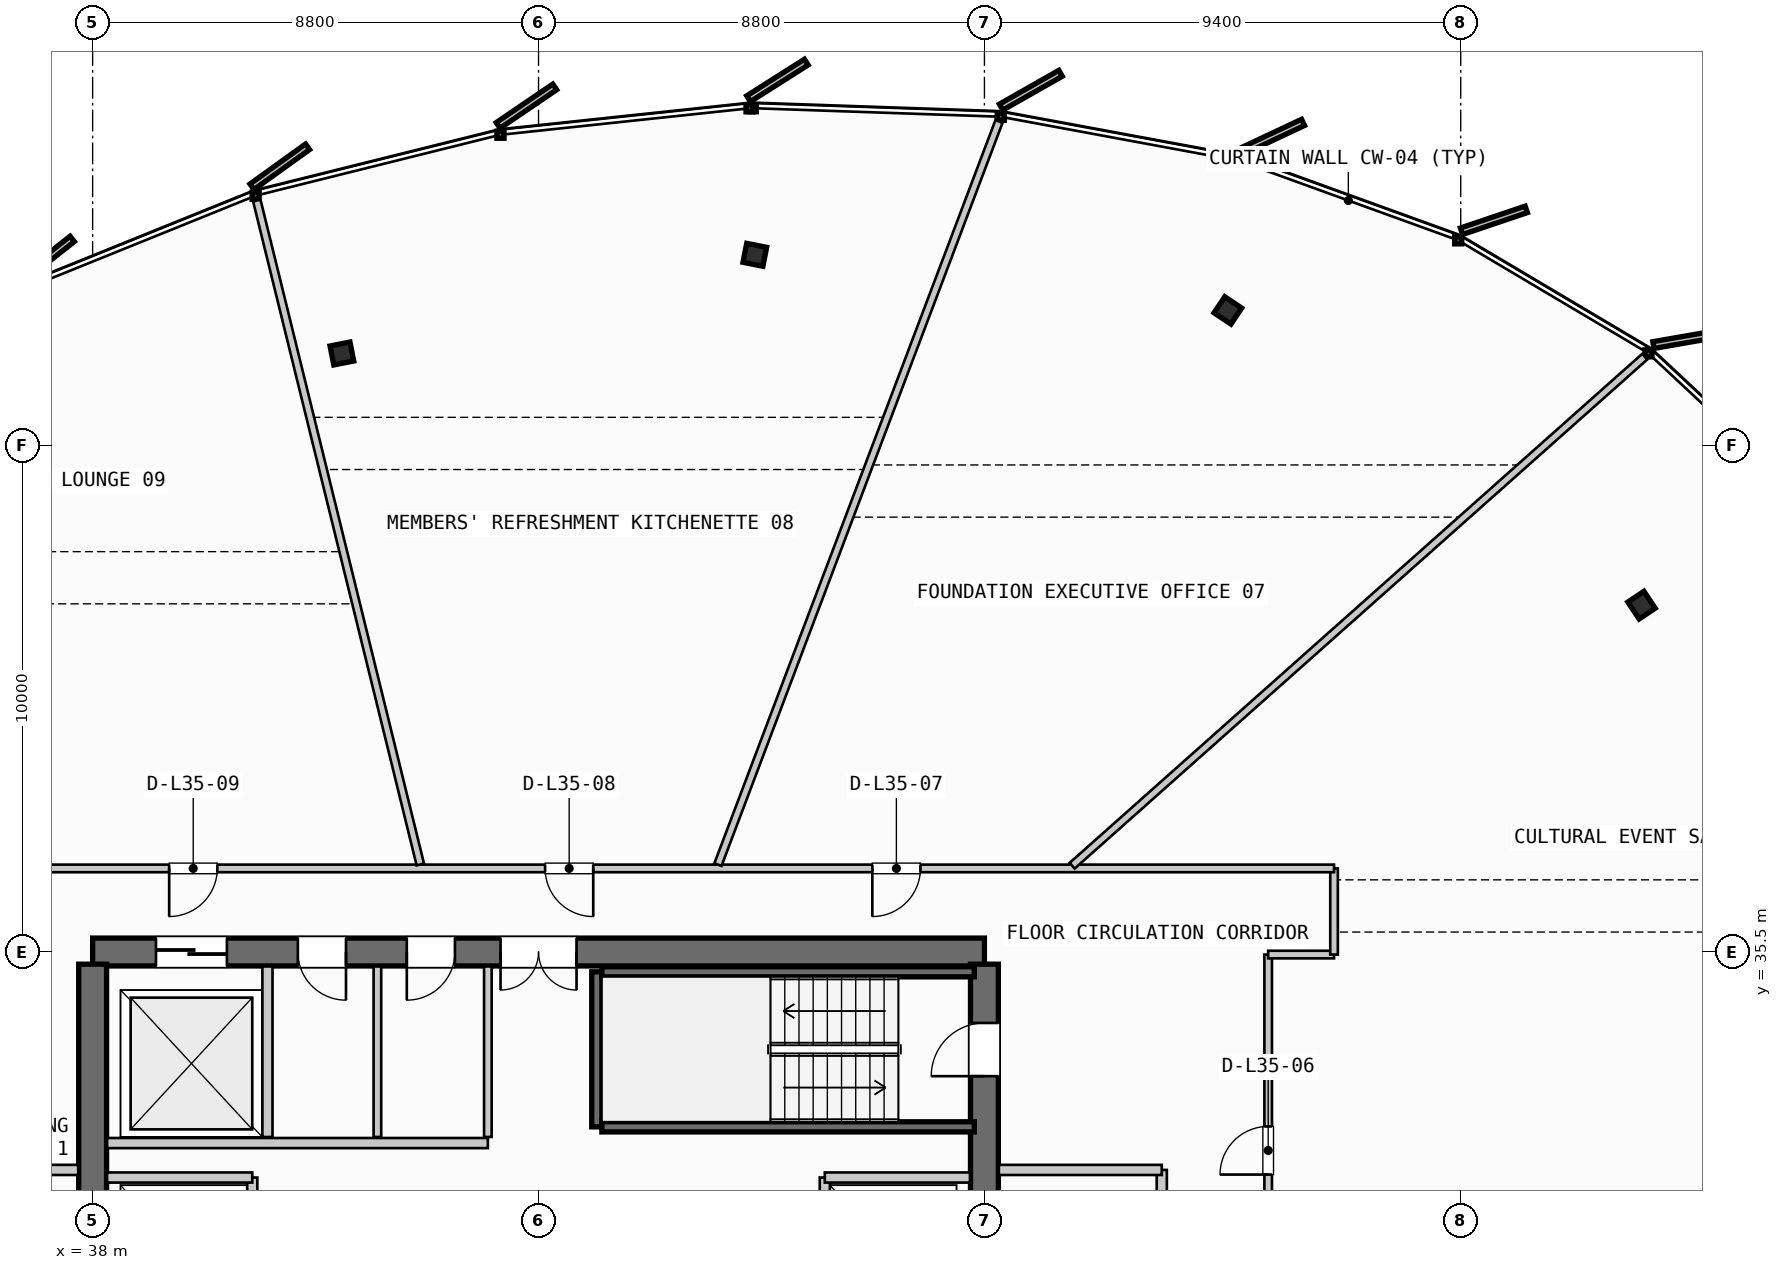
"""IFC4 building model, lengths in metres.
Left out: names, types, materials, properties, quantities, classifications, styles, units other than length and angle.
Written with IfcOpenShell. Run it as: python <this file> out.ifc"""

import sys

from ifc_helpers import new_model, si_unit, direction, frame, frame_2d, origin, origin_2d, place, context, subcontext, project, spatial, rectangle, i_section, extrude, source, transform, mapped, element, fill, save


model = new_model("IFC4")
c1 = context("Model", 3, precision=1e-05, world=origin(), true_north=direction((0.0, 1.0)))
c2 = subcontext(c1, "Body", "Model", "MODEL_VIEW")
j1 = project(units=[si_unit("LENGTHUNIT", "METRE"), si_unit("PLANEANGLEUNIT", "RADIAN")], contexts=[c1])
p1 = place(None, origin())
s1 = spatial("IfcSite", under=j1, at=p1, CompositionType="ELEMENT")
p2 = place(p1, origin())
s2 = spatial("IfcBuilding", under=s1, at=p2, CompositionType="ELEMENT")
p3 = place(p2, frame((0.0, 0.0, 139.45)))
s3 = spatial("IfcBuildingStorey", under=s2, at=p3, CompositionType="ELEMENT", Elevation=139.45)
p4 = place(p3, frame((55.6, 35.5, 0.0), z_axis=(0.0, 0.0, 1.0), x_axis=(-1.0, 0.0, 0.0)))
e1 = element("IfcWall", 1, at=p4, inside=s3, PredefinedType="SHEAR", context=c2, shape_type="SweptSolid", body=[
    extrude(rectangle(XDim=17.6, YDim=0.55, at=frame_2d((8.8, 0.0))), origin(), (0.0, 0.0, 1.0), 3.3),
])
p5 = place(p4, frame((8.05, 0.0, 0.0)))
e2 = element("IfcOpeningElement", 2, at=p5, cuts=e1, PredefinedType="OPENING", context=c2, shape_type="SweptSolid", body=[
    extrude(rectangle(XDim=1.5, YDim=2.2, at=frame_2d((0.75, 1.1))), frame((0.0, 0.285, 0.0), z_axis=(0.0, -1.0, 0.0), x_axis=(1.0, 0.0, 0.0)), (0.0, 0.0, 1.0), 0.57),
])
p6 = place(p4, frame((14.95, 0.0, 0.0)))
e3 = element("IfcOpeningElement", 3, at=p6, cuts=e1, PredefinedType="OPENING", context=c2, shape_type="SweptSolid", body=[
    extrude(rectangle(XDim=1.4, YDim=2.3, at=frame_2d((0.7, 1.15))), frame((0.0, 0.285, 0.0), z_axis=(0.0, -1.0, 0.0), x_axis=(1.0, 0.0, 0.0)), (0.0, 0.0, 1.0), 0.57),
])
p7 = place(p4, frame((12.6, 0.0, 0.0)))
e4 = element("IfcOpeningElement", 4, at=p7, cuts=e1, PredefinedType="OPENING", context=c2, shape_type="SweptSolid", body=[
    extrude(rectangle(XDim=0.95, YDim=2.15, at=frame_2d((0.475, 1.075))), frame((0.0, 0.285, 0.0), z_axis=(0.0, -1.0, 0.0), x_axis=(1.0, 0.0, 0.0)), (0.0, 0.0, 1.0), 0.57),
])
p8 = place(p4, frame((10.45, 0.0, 0.0)))
e5 = element("IfcOpeningElement", 5, at=p8, cuts=e1, PredefinedType="OPENING", context=c2, shape_type="SweptSolid", body=[
    extrude(rectangle(XDim=0.95, YDim=2.15, at=frame_2d((0.475, 1.075))), frame((0.0, 0.285, 0.0), z_axis=(0.0, -1.0, 0.0), x_axis=(1.0, 0.0, 0.0)), (0.0, 0.0, 1.0), 0.57),
])
p9 = place(p3, frame((38.0, 35.26, 0.0), z_axis=(0.0, 0.0, 1.0), x_axis=(0.0, -1.0, 0.0)))
e6 = element("IfcWall", 6, at=p9, inside=s3, PredefinedType="SHEAR", context=c2, shape_type="SweptSolid", body=[
    extrude(rectangle(XDim=14.92, YDim=0.55, at=frame_2d((7.46, 0.0))), origin(), (0.0, 0.0, 1.0), 3.3),
])
p10 = place(p9, frame((5.21, 0.0, 0.0)))
e7 = element("IfcOpeningElement", 7, at=p10, cuts=e6, PredefinedType="OPENING", context=c2, shape_type="SweptSolid", body=[
    extrude(rectangle(XDim=1.1, YDim=2.2, at=frame_2d((0.55, 1.1))), frame((0.0, 0.285, 0.0), z_axis=(0.0, -1.0, 0.0), x_axis=(1.0, 0.0, 0.0)), (0.0, 0.0, 1.0), 0.57),
])
p11 = place(p3, frame((55.6, 20.34, 0.0), z_axis=(0.0, 0.0, 1.0), x_axis=(0.0, 1.0, 0.0)))
e8 = element("IfcWall", 8, at=p11, inside=s3, PredefinedType="SHEAR", context=c2, shape_type="SweptSolid", body=[
    extrude(rectangle(XDim=14.92, YDim=0.55, at=frame_2d((7.46, 0.0))), origin(), (0.0, 0.0, 1.0), 3.3),
])
p12 = place(p11, frame((12.71, 0.0, 0.0)))
e9 = element("IfcOpeningElement", 9, at=p12, cuts=e8, PredefinedType="OPENING", context=c2, shape_type="SweptSolid", body=[
    extrude(rectangle(XDim=1.05, YDim=2.15, at=frame_2d((0.525, 1.075))), frame((0.0, 0.285, 0.0), z_axis=(0.0, -1.0, 0.0), x_axis=(1.0, 0.0, 0.0)), (0.0, 0.0, 1.0), 0.57),
])
p13 = place(p11, frame((8.61, 0.0, 0.0)))
e10 = element("IfcOpeningElement", 10, at=p13, cuts=e8, PredefinedType="OPENING", context=c2, shape_type="SweptSolid", body=[
    extrude(rectangle(XDim=1.1, YDim=2.2, at=frame_2d((0.55, 1.1))), frame((0.0, 0.285, 0.0), z_axis=(0.0, -1.0, 0.0), x_axis=(1.0, 0.0, 0.0)), (0.0, 0.0, 1.0), 0.57),
])
m1 = source(origin(), c2, "Body", "SweptSolid", [
    extrude(i_section(OverallWidth=0.401, OverallDepth=0.381, WebThickness=0.032, FlangeThickness=0.051, FilletRadius=0.015, at=origin_2d()), origin(), (0.0, 0.0, 1.0), 3.3),
])
for number, where, z_axis, x_axis in (
    (11, (68.569, 42.345, 0.0), (0.0, 0.0, 1.0), (0.831, 0.556, 0.0)),
    (12, (60.405, 48.161, 0.0), (0.0, 0.0, 1.0), (0.556, 0.831, 0.0)),
    (13, (51.069, 49.259, 0.0), (0.0, 0.0, 1.0), (0.195, 0.981, 0.0)),
    (14, (42.919, 47.311, 0.0), (0.0, 0.0, 1.0), (-0.195, 0.981, 0.0)),
):
    element("IfcColumn", number, at=place(p3, frame(where, z_axis=z_axis, x_axis=x_axis)), inside=s3, PredefinedType="COLUMN", context=c2, shape_type="MappedRepresentation", body=[
        mapped(m1, transform((0.0, 0.0, 0.0), scale=1.0)),
    ])
p14 = place(p3, frame((47.95, 32.05, 0.0), z_axis=(0.0, 0.0, 1.0), x_axis=(0.0, 1.0, 0.0)))
e15 = element("IfcWall", 15, at=p14, inside=s3, PredefinedType="SHEAR", context=c2, shape_type="SweptSolid", body=[
    extrude(rectangle(XDim=3.06, YDim=0.2, at=frame_2d((1.53, 0.0))), origin(), (0.0, 0.0, 1.0), 3.3),
])
for number, where, z_axis, x_axis in (
    (16, (48.05, 35.11, 0.0), (0.0, 0.0, 1.0), (1.0, 0.0, 0.0)),
    (17, (55.4, 32.05, 0.0), (0.0, 0.0, 1.0), (-1.0, 0.0, 0.0)),
):
    element("IfcWall", number, at=place(p3, frame(where, z_axis=z_axis, x_axis=x_axis)), inside=s3, PredefinedType="SHEAR", context=c2, shape_type="SweptSolid", body=[
        extrude(rectangle(XDim=7.35, YDim=0.2, at=frame_2d((3.675, 0.0))), origin(), (0.0, 0.0, 1.0), 3.3),
    ])
p15 = place(p3, frame((41.15, 27.95, 0.0), z_axis=(0.0, 0.0, 1.0), x_axis=(0.0, 1.0, 0.0)))
e18 = element("IfcWall", 18, at=p15, inside=s3, PredefinedType="PARTITIONING", context=c2, shape_type="SweptSolid", body=[
    extrude(rectangle(XDim=3.1, YDim=0.2, at=frame_2d((1.55, 0.0))), origin(), (0.0, 0.0, 1.0), 2.305),
])
p16 = place(p3, frame((38.285, 31.05, 0.0), z_axis=(0.0, 0.0, 1.0), x_axis=(1.0, 0.0, 0.0)))
e19 = element("IfcWall", 19, at=p16, inside=s3, PredefinedType="PARTITIONING", context=c2, shape_type="SweptSolid", body=[
    extrude(rectangle(XDim=2.865, YDim=0.2, at=frame_2d((1.433, 0.0))), origin(), (0.0, 0.0, 1.0), 2.305),
])
p17 = place(p3, frame((34.5, 31.2, 0.0), z_axis=(0.0, 0.0, 1.0), x_axis=(1.0, 0.0, 0.0)))
e20 = element("IfcWall", 20, at=p17, inside=s3, PredefinedType="PARTITIONING", context=c2, shape_type="SweptSolid", body=[
    extrude(rectangle(XDim=3.215, YDim=0.2, at=frame_2d((1.607, 0.0))), origin(), (0.0, 0.0, 1.0), 2.305),
])
p18 = place(p3, frame((52.45, 27.95, 0.0), z_axis=(0.0, 0.0, 1.0), x_axis=(0.0, 1.0, 0.0)))
e21 = element("IfcWall", 21, at=p18, inside=s3, PredefinedType="PARTITIONING", context=c2, shape_type="SweptSolid", body=[
    extrude(rectangle(XDim=3.1, YDim=0.2, at=frame_2d((1.55, 0.0))), origin(), (0.0, 0.0, 1.0), 2.305),
])
p19 = place(p3, frame((52.45, 31.05, 0.0), z_axis=(0.0, 0.0, 1.0), x_axis=(1.0, 0.0, 0.0)))
e22 = element("IfcWall", 22, at=p19, inside=s3, PredefinedType="PARTITIONING", context=c2, shape_type="SweptSolid", body=[
    extrude(rectangle(XDim=2.865, YDim=0.2, at=frame_2d((1.433, 0.0))), origin(), (0.0, 0.0, 1.0), 2.305),
])
p20 = place(p3, frame((59.1, 26.8, 0.0), z_axis=(0.0, 0.0, 1.0), x_axis=(0.0, 1.0, 0.0)))
e23 = element("IfcWall", 23, at=p20, inside=s3, PredefinedType="PARTITIONING", context=c2, shape_type="SweptSolid", body=[
    extrude(rectangle(XDim=4.4, YDim=0.2, at=frame_2d((2.2, 0.0))), origin(), (0.0, 0.0, 1.0), 2.305),
])
p21 = place(p20, frame((1.65, 0.0, 0.0)))
e24 = element("IfcOpeningElement", 24, at=p21, cuts=e23, PredefinedType="OPENING", context=c2, shape_type="SweptSolid", body=[
    extrude(rectangle(XDim=1.05, YDim=2.15, at=frame_2d((0.525, 1.075))), frame((0.0, 0.11, 0.0), z_axis=(0.0, -1.0, 0.0), x_axis=(1.0, 0.0, 0.0)), (0.0, 0.0, 1.0), 0.22),
])
p22 = place(p3, frame((55.885, 31.2, 0.0), z_axis=(0.0, 0.0, 1.0), x_axis=(1.0, 0.0, 0.0)))
e25 = element("IfcWall", 25, at=p22, inside=s3, PredefinedType="PARTITIONING", context=c2, shape_type="SweptSolid", body=[
    extrude(rectangle(XDim=3.215, YDim=0.2, at=frame_2d((1.607, 0.0))), origin(), (0.0, 0.0, 1.0), 2.305),
])
p23 = place(p3, frame((41.45, 31.85, 0.0), z_axis=(0.0, 0.0, 1.0), x_axis=(0.0, 1.0, 0.0)))
e26 = element("IfcWall", 26, at=p23, inside=s3, PredefinedType="PARTITIONING", context=c2, shape_type="SweptSolid", body=[
    extrude(rectangle(XDim=3.365, YDim=0.2, at=frame_2d((1.683, 0.0))), origin(), (0.0, 0.0, 1.0), 2.305),
])
p24 = place(p3, frame((38.285, 31.73, 0.0), z_axis=(0.0, 0.0, 1.0), x_axis=(1.0, 0.0, 0.0)))
e27 = element("IfcWall", 27, at=p24, inside=s3, PredefinedType="PARTITIONING", context=c2, shape_type="SweptSolid", body=[
    extrude(rectangle(XDim=7.515, YDim=0.2, at=frame_2d((3.758, 0.0))), origin(), (0.0, 0.0, 1.0), 2.305),
])
p25 = place(p3, frame((45.8, 31.85, 0.0), z_axis=(0.0, 0.0, 1.0), x_axis=(0.0, 1.0, 0.0)))
e28 = element("IfcWall", 28, at=p25, inside=s3, PredefinedType="PARTITIONING", context=c2, shape_type="SweptSolid", body=[
    extrude(rectangle(XDim=3.365, YDim=0.15, at=frame_2d((1.683, 0.0))), origin(), (0.0, 0.0, 1.0), 2.305),
])
p26 = place(p3, frame((43.62, 31.85, 0.0), z_axis=(0.0, 0.0, 1.0), x_axis=(0.0, 1.0, 0.0)))
e29 = element("IfcWall", 29, at=p26, inside=s3, PredefinedType="PLUMBINGWALL", context=c2, shape_type="SweptSolid", body=[
    extrude(rectangle(XDim=3.365, YDim=0.15, at=frame_2d((1.683, 0.0))), origin(), (0.0, 0.0, 1.0), 2.305),
])
p27 = place(p3, frame((61.2, 20.15, 0.0), z_axis=(0.0, 0.0, 1.0), x_axis=(0.0, 1.0, 0.0)))
e30 = element("IfcWall", 30, at=p27, inside=s3, PredefinedType="PARTITIONING", context=c2, shape_type="SweptSolid", body=[
    extrude(rectangle(XDim=15.3, YDim=0.15, at=frame_2d((7.65, 0.0))), origin(), (0.0, 0.0, 1.0), 2.305),
])
p28 = place(p27, frame((5.187, 0.0, 0.0)))
e31 = element("IfcOpeningElement", 31, at=p28, cuts=e30, PredefinedType="OPENING", context=c2, shape_type="SweptSolid", body=[
    extrude(rectangle(XDim=0.95, YDim=2.15, at=frame_2d((0.475, 1.075))), frame((0.0, 0.085, 0.0), z_axis=(0.0, -1.0, 0.0), x_axis=(1.0, 0.0, 0.0)), (0.0, 0.0, 1.0), 0.17),
])
p29 = place(p27, frame((10.958, 0.0, 0.0)))
e32 = element("IfcOpeningElement", 32, at=p29, cuts=e30, PredefinedType="OPENING", context=c2, shape_type="SweptSolid", body=[
    extrude(rectangle(XDim=0.95, YDim=2.15, at=frame_2d((0.475, 1.075))), frame((0.0, 0.085, 0.0), z_axis=(0.0, -1.0, 0.0), x_axis=(1.0, 0.0, 0.0)), (0.0, 0.0, 1.0), 0.17),
])
p30 = place(p3, frame((61.2, 35.45, 0.0), z_axis=(0.0, 0.0, 1.0), x_axis=(1.0, 0.0, 0.0)))
e33 = element("IfcWall", 33, at=p30, inside=s3, PredefinedType="PARTITIONING", context=c2, shape_type="SweptSolid", body=[
    extrude(rectangle(XDim=1.3, YDim=0.15, at=frame_2d((0.65, 0.0))), origin(), (0.0, 0.0, 1.0), 2.305),
])
p31 = place(p3, frame((62.5, 35.45, 0.0), z_axis=(0.0, 0.0, 1.0), x_axis=(0.0, 1.0, 0.0)))
e34 = element("IfcWall", 34, at=p31, inside=s3, PredefinedType="PARTITIONING", context=c2, shape_type="SweptSolid", body=[
    extrude(rectangle(XDim=1.7, YDim=0.15, at=frame_2d((0.85, 0.0))), origin(), (0.0, 0.0, 1.0), 2.305),
])
p32 = place(p3, frame((62.5, 37.15, 0.0), z_axis=(0.0, 0.0, 1.0), x_axis=(-1.0, 0.0, 0.0)))
e35 = element("IfcWall", 35, at=p32, inside=s3, PredefinedType="PARTITIONING", context=c2, shape_type="SweptSolid", body=[
    extrude(rectangle(XDim=31.4, YDim=0.15, at=frame_2d((15.7, 0.0))), origin(), (0.0, 0.0, 1.0), 2.305),
])
p33 = place(p32, frame((8.163, 0.0, 0.0)))
e36 = element("IfcOpeningElement", 36, at=p33, cuts=e35, PredefinedType="OPENING", context=c2, shape_type="SweptSolid", body=[
    extrude(rectangle(XDim=0.95, YDim=2.15, at=frame_2d((0.475, 1.075))), frame((0.0, 0.085, 0.0), z_axis=(0.0, -1.0, 0.0), x_axis=(1.0, 0.0, 0.0)), (0.0, 0.0, 1.0), 0.17),
])
p34 = place(p32, frame((14.62, 0.0, 0.0)))
e37 = element("IfcOpeningElement", 37, at=p34, cuts=e35, PredefinedType="OPENING", context=c2, shape_type="SweptSolid", body=[
    extrude(rectangle(XDim=0.95, YDim=2.15, at=frame_2d((0.475, 1.075))), frame((0.0, 0.085, 0.0), z_axis=(0.0, -1.0, 0.0), x_axis=(1.0, 0.0, 0.0)), (0.0, 0.0, 1.0), 0.17),
])
p35 = place(p32, frame((22.04, 0.0, 0.0)))
e38 = element("IfcOpeningElement", 38, at=p35, cuts=e35, PredefinedType="OPENING", context=c2, shape_type="SweptSolid", body=[
    extrude(rectangle(XDim=0.95, YDim=2.15, at=frame_2d((0.475, 1.075))), frame((0.0, 0.085, 0.0), z_axis=(0.0, -1.0, 0.0), x_axis=(1.0, 0.0, 0.0)), (0.0, 0.0, 1.0), 0.17),
])
p36 = place(p3, frame((57.332, 37.203, 0.0), z_axis=(0.0, 0.0, 1.0), x_axis=(0.747365661558, 0.664412949847, 0.0)))
e39 = element("IfcWall", 39, at=p36, inside=s3, PredefinedType="PARTITIONING", context=c2, shape_type="SweptSolid", body=[
    extrude(rectangle(XDim=15.119, YDim=0.15, at=frame_2d((7.56, 0.0))), origin(), (0.0, 0.0, 1.0), 2.305),
])
p37 = place(p3, frame((50.341, 37.225, 0.0), z_axis=(0.0, 0.0, 1.0), x_axis=(0.353744838931, 0.935341963631, 0.0)))
e40 = element("IfcWall", 40, at=p37, inside=s3, PredefinedType="PARTITIONING", context=c2, shape_type="SweptSolid", body=[
    extrude(rectangle(XDim=15.679, YDim=0.15, at=frame_2d((7.839, 0.0))), origin(), (0.0, 0.0, 1.0), 2.305),
])
p38 = place(p3, frame((44.467, 37.228, 0.0), z_axis=(0.0, 0.0, 1.0), x_axis=(-0.239136633235, 0.97098592711, 0.0)))
e41 = element("IfcWall", 41, at=p38, inside=s3, PredefinedType="PARTITIONING", context=c2, shape_type="SweptSolid", body=[
    extrude(rectangle(XDim=13.492, YDim=0.15, at=frame_2d((6.746, 0.0))), origin(), (0.0, 0.0, 1.0), 2.305),
])
m2 = source(origin(), c2, "Body", "SweptSolid", [
    extrude(rectangle(XDim=1.05, YDim=2.15, at=frame_2d((0.525, 1.075))), frame((0.0, 0.025, 0.0), z_axis=(0.0, -1.0, 0.0), x_axis=(1.0, 0.0, 0.0)), (0.0, 0.0, 1.0), 0.05),
])
p39 = place(p12, origin())
e42 = element("IfcDoor", 42, at=p39, inside=s3, OperationType="SINGLE_SWING_LEFT", PredefinedType="DOOR", context=c2, shape_type="MappedRepresentation", body=[
    mapped(m2, transform((0.0, 0.0, 0.0), scale=1.0)),
])
fill(e9, e42)
m3 = source(origin(), c2, "Body", "SweptSolid", [
    extrude(rectangle(XDim=1.5, YDim=2.2, at=frame_2d((0.75, 1.1))), frame((0.0, 0.025, 0.0), z_axis=(0.0, -1.0, 0.0), x_axis=(1.0, 0.0, 0.0)), (0.0, 0.0, 1.0), 0.05),
])
p40 = place(p5, origin())
e43 = element("IfcDoor", 43, at=p40, inside=s3, OperationType="DOUBLE_DOOR_SINGLE_SWING", PredefinedType="DOOR", context=c2, shape_type="MappedRepresentation", body=[
    mapped(m3, transform((0.0, 0.0, 0.0), scale=1.0)),
])
fill(e2, e43)
m4 = source(origin(), c2, "Body", "SweptSolid", [
    extrude(rectangle(XDim=1.4, YDim=2.3, at=frame_2d((0.7, 1.15))), frame((0.0, 0.025, 0.0), z_axis=(0.0, -1.0, 0.0), x_axis=(1.0, 0.0, 0.0)), (0.0, 0.0, 1.0), 0.05),
])
p41 = place(p6, origin())
e44 = element("IfcDoor", 44, at=p41, inside=s3, OperationType="SLIDING_TO_RIGHT", PredefinedType="DOOR", context=c2, shape_type="MappedRepresentation", body=[
    mapped(m4, transform((0.0, 0.0, 0.0), scale=1.0)),
])
fill(e3, e44)
m5 = source(origin(), c2, "Body", "SweptSolid", [
    extrude(rectangle(XDim=0.95, YDim=2.15, at=frame_2d((0.475, 1.075))), frame((0.0, 0.025, 0.0), z_axis=(0.0, -1.0, 0.0), x_axis=(1.0, 0.0, 0.0)), (0.0, 0.0, 1.0), 0.05),
])
p42 = place(p7, origin())
e45 = element("IfcDoor", 45, at=p42, inside=s3, OperationType="SINGLE_SWING_LEFT", PredefinedType="DOOR", context=c2, shape_type="MappedRepresentation", body=[
    mapped(m5, transform((0.0, 0.0, 0.0), scale=1.0)),
])
fill(e4, e45)
p43 = place(p8, origin())
e46 = element("IfcDoor", 46, at=p43, inside=s3, OperationType="SINGLE_SWING_RIGHT", PredefinedType="DOOR", context=c2, shape_type="MappedRepresentation", body=[
    mapped(m5, transform((0.0, 0.0, 0.0), scale=1.0)),
])
fill(e5, e46)
p44 = place(p29, origin())
e47 = element("IfcDoor", 47, at=p44, inside=s3, OperationType="SINGLE_SWING_LEFT", PredefinedType="DOOR", context=c2, shape_type="MappedRepresentation", body=[
    mapped(m5, transform((0.0, 0.0, 0.0), scale=1.0)),
])
fill(e32, e47)
p45 = place(p33, origin())
e48 = element("IfcDoor", 48, at=p45, inside=s3, OperationType="SINGLE_SWING_RIGHT", PredefinedType="DOOR", context=c2, shape_type="MappedRepresentation", body=[
    mapped(m5, transform((0.0, 0.0, 0.0), scale=1.0)),
])
fill(e36, e48)
p46 = place(p34, origin())
e49 = element("IfcDoor", 49, at=p46, inside=s3, OperationType="SINGLE_SWING_LEFT", PredefinedType="DOOR", context=c2, shape_type="MappedRepresentation", body=[
    mapped(m5, transform((0.0, 0.0, 0.0), scale=1.0)),
])
fill(e37, e49)
p47 = place(p35, origin())
e50 = element("IfcDoor", 50, at=p47, inside=s3, OperationType="SINGLE_SWING_RIGHT", PredefinedType="DOOR", context=c2, shape_type="MappedRepresentation", body=[
    mapped(m5, transform((0.0, 0.0, 0.0), scale=1.0)),
])
fill(e38, e50)
save(model, sys.argv[1])
